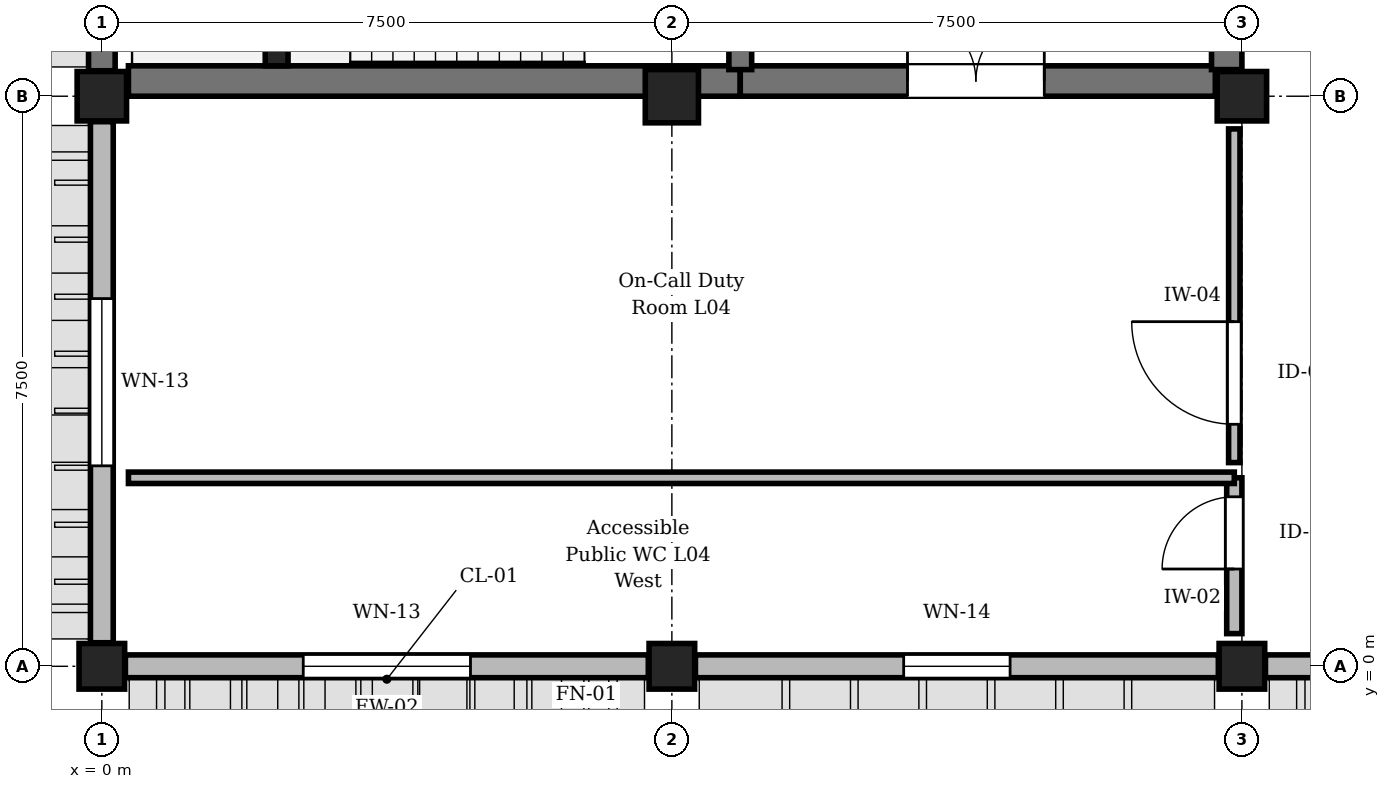
"""IFC4 building model, lengths in metres.
Left out: names, types, materials, properties, quantities, classifications, styles, units other than length and angle.
Written with IfcOpenShell. Run it as: python <this file> out.ifc"""

import sys

from ifc_helpers import new_model, si_unit, direction, frame, frame_2d, origin, origin_with_axes, origin_2d, place, context, subcontext, project, spatial, rectangle, circle, i_section, extrude, element, fill, save


model = new_model("IFC4")
c1 = context("Model", 3, precision=1e-05, world=origin(), true_north=direction((0.0, 1.0)))
c2 = subcontext(c1, "Body", "Model", "MODEL_VIEW")
j1 = project(units=[si_unit("LENGTHUNIT", "METRE"), si_unit("PLANEANGLEUNIT", "RADIAN")], contexts=[c1])
p1 = place(None, origin())
s1 = spatial("IfcSite", under=j1, at=p1, CompositionType="ELEMENT")
p2 = place(p1, origin())
s2 = spatial("IfcBuilding", under=s1, at=p2, CompositionType="ELEMENT")
p3 = place(p2, frame((0.0, 0.0, 17.85)))
s3 = spatial("IfcBuildingStorey", under=s2, at=p3, CompositionType="ELEMENT", Elevation=17.85)
p4 = place(p3, origin_with_axes())
e1 = element("IfcColumn", 1, at=p4, inside=s3, PredefinedType="COLUMN", context=c2, shape_type="SweptSolid", body=[
    extrude(circle(Radius=0.3, at=origin_2d()), origin(), (0.0, 0.0, 1.0), 4.05),
])
p5 = place(p3, frame((0.0, 7.5, 0.0), z_axis=(0.0, 0.0, 1.0), x_axis=(1.0, 0.0, 0.0)))
e2 = element("IfcColumn", 2, at=p5, inside=s3, PredefinedType="COLUMN", context=c2, shape_type="SweptSolid", body=[
    extrude(rectangle(XDim=0.65, YDim=0.65, at=origin_2d()), origin(), (0.0, 0.0, 1.0), 4.05),
])
p6 = place(p3, frame((7.5, 0.0, 0.0), z_axis=(0.0, 0.0, 1.0), x_axis=(1.0, 0.0, 0.0)))
e3 = element("IfcColumn", 3, at=p6, inside=s3, PredefinedType="COLUMN", context=c2, shape_type="SweptSolid", body=[
    extrude(rectangle(XDim=0.6, YDim=0.6, at=origin_2d()), origin(), (0.0, 0.0, 1.0), 4.05),
])
p7 = place(p3, frame((7.5, 7.5, 0.0), z_axis=(0.0, 0.0, 1.0), x_axis=(1.0, 0.0, 0.0)))
e4 = element("IfcColumn", 4, at=p7, inside=s3, PredefinedType="COLUMN", context=c2, shape_type="SweptSolid", body=[
    extrude(rectangle(XDim=0.7, YDim=0.7, at=origin_2d()), origin(), (0.0, 0.0, 1.0), 4.05),
])
p8 = place(p3, frame((15.0, 0.0, 0.0), z_axis=(0.0, 0.0, 1.0), x_axis=(1.0, 0.0, 0.0)))
e5 = element("IfcColumn", 5, at=p8, inside=s3, PredefinedType="COLUMN", context=c2, shape_type="SweptSolid", body=[
    extrude(rectangle(XDim=0.6, YDim=0.6, at=origin_2d()), origin(), (0.0, 0.0, 1.0), 4.05),
])
p9 = place(p3, frame((15.0, 7.5, 0.0), z_axis=(0.0, 0.0, 1.0), x_axis=(1.0, 0.0, 0.0)))
e6 = element("IfcColumn", 6, at=p9, inside=s3, PredefinedType="COLUMN", context=c2, shape_type="SweptSolid", body=[
    extrude(rectangle(XDim=0.65, YDim=0.65, at=origin_2d()), origin(), (0.0, 0.0, 1.0), 4.05),
])
p10 = place(p3, frame((2.3, 8.05, 0.0), z_axis=(0.0, 0.0, 1.0), x_axis=(1.0, 0.0, 0.0)))
e7 = element("IfcColumn", 7, at=p10, inside=s3, PredefinedType="COLUMN", context=c2, shape_type="SweptSolid", body=[
    extrude(i_section(OverallWidth=0.3, OverallDepth=0.3, WebThickness=0.011, FlangeThickness=0.019, FilletRadius=0.027, at=origin_2d()), origin(), (0.0, 0.0, 1.0), 4.05),
])
p11 = place(p3, frame((7.19, 0.0, 0.0), z_axis=(0.0, 0.0, 1.0), x_axis=(-1.0, 0.0, 0.0)))
e8 = element("IfcWall", 8, at=p11, inside=s3, PredefinedType="STANDARD", context=c2, shape_type="SweptSolid", body=[
    extrude(rectangle(XDim=6.88, YDim=0.3, at=frame_2d((3.44, 0.0))), origin(), (0.0, 0.0, 1.0), 3.17),
])
p12 = place(p11, frame((2.34, 0.0, 0.9)))
e9 = element("IfcOpeningElement", 9, at=p12, cuts=e8, PredefinedType="OPENING", context=c2, shape_type="SweptSolid", body=[
    extrude(rectangle(XDim=2.2, YDim=1.95, at=frame_2d((1.1, 0.975))), frame((0.0, 0.16, 0.0), z_axis=(0.0, -1.0, 0.0), x_axis=(1.0, 0.0, 0.0)), (0.0, 0.0, 1.0), 0.32),
])
p13 = place(p3, frame((0.0, 0.31, 0.0), z_axis=(0.0, 0.0, 1.0), x_axis=(0.0, 1.0, 0.0)))
e10 = element("IfcWall", 10, at=p13, inside=s3, PredefinedType="STANDARD", context=c2, shape_type="SweptSolid", body=[
    extrude(rectangle(XDim=6.855, YDim=0.3, at=frame_2d((3.427, 0.0))), origin(), (0.0, 0.0, 1.0), 3.17),
])
p14 = place(p13, frame((2.327, 0.0, 0.9)))
e11 = element("IfcOpeningElement", 11, at=p14, cuts=e10, PredefinedType="OPENING", context=c2, shape_type="SweptSolid", body=[
    extrude(rectangle(XDim=2.2, YDim=1.95, at=frame_2d((1.1, 0.975))), frame((0.0, 0.16, 0.0), z_axis=(0.0, -1.0, 0.0), x_axis=(1.0, 0.0, 0.0)), (0.0, 0.0, 1.0), 0.32),
])
p15 = place(p3, frame((0.0, 7.835, 0.0), z_axis=(0.0, 0.0, 1.0), x_axis=(0.0, 1.0, 0.0)))
e12 = element("IfcWall", 12, at=p15, inside=s3, PredefinedType="SHEAR", context=c2, shape_type="SweptSolid", body=[
    extrude(rectangle(XDim=6.805, YDim=0.35, at=frame_2d((3.402, 0.0))), origin(), (0.0, 0.0, 1.0), 3.77),
])
p16 = place(p3, frame((14.69, 0.0, 0.0), z_axis=(0.0, 0.0, 1.0), x_axis=(-1.0, 0.0, 0.0)))
e13 = element("IfcWall", 13, at=p16, inside=s3, PredefinedType="STANDARD", context=c2, shape_type="SweptSolid", body=[
    extrude(rectangle(XDim=6.88, YDim=0.3, at=frame_2d((3.44, 0.0))), origin(), (0.0, 0.0, 1.0), 3.17),
])
p17 = place(p16, frame((2.74, 0.0, 0.9)))
e14 = element("IfcOpeningElement", 14, at=p17, cuts=e13, PredefinedType="OPENING", context=c2, shape_type="SweptSolid", body=[
    extrude(rectangle(XDim=1.4, YDim=1.8, at=frame_2d((0.7, 0.9))), frame((0.0, 0.16, 0.0), z_axis=(0.0, -1.0, 0.0), x_axis=(1.0, 0.0, 0.0)), (0.0, 0.0, 1.0), 0.32),
])
p18 = place(p3, frame((22.19, 0.0, 0.0), z_axis=(0.0, 0.0, 1.0), x_axis=(-1.0, 0.0, 0.0)))
e15 = element("IfcWall", 15, at=p18, inside=s3, PredefinedType="STANDARD", context=c2, shape_type="SweptSolid", body=[
    extrude(rectangle(XDim=6.88, YDim=0.3, at=frame_2d((3.44, 0.0))), origin(), (0.0, 0.0, 1.0), 3.17),
])
p19 = place(p18, frame((2.64, 0.0, 0.9)))
e16 = element("IfcOpeningElement", 16, at=p19, cuts=e15, PredefinedType="OPENING", context=c2, shape_type="SweptSolid", body=[
    extrude(rectangle(XDim=1.6, YDim=1.8, at=frame_2d((0.8, 0.9))), frame((0.0, 0.16, 0.0), z_axis=(0.0, -1.0, 0.0), x_axis=(1.0, 0.0, 0.0)), (0.0, 0.0, 1.0), 0.32),
])
p20 = place(p3, frame((0.35, 7.7, 0.0), z_axis=(0.0, 0.0, 1.0), x_axis=(1.0, 0.0, 0.0)))
e17 = element("IfcWall", 17, at=p20, inside=s3, PredefinedType="SHEAR", context=c2, shape_type="SweptSolid", body=[
    extrude(rectangle(XDim=8.05, YDim=0.4, at=frame_2d((4.025, 0.0))), origin(), (0.0, 0.0, 1.0), 3.77),
])
p21 = place(p3, frame((8.4, 7.7, 0.0), z_axis=(0.0, 0.0, 1.0), x_axis=(1.0, 0.0, 0.0)))
e18 = element("IfcWall", 18, at=p21, inside=s3, PredefinedType="SHEAR", context=c2, shape_type="SweptSolid", body=[
    extrude(rectangle(XDim=6.25, YDim=0.4, at=frame_2d((3.125, 0.0))), origin(), (0.0, 0.0, 1.0), 3.77),
])
p22 = place(p21, frame((2.2, 0.0, 0.0)))
e19 = element("IfcOpeningElement", 19, at=p22, cuts=e18, PredefinedType="OPENING", context=c2, shape_type="SweptSolid", body=[
    extrude(rectangle(XDim=1.8, YDim=2.25, at=frame_2d((0.9, 1.125))), frame((0.0, 0.21, 0.0), z_axis=(0.0, -1.0, 0.0), x_axis=(1.0, 0.0, 0.0)), (0.0, 0.0, 1.0), 0.42),
])
p23 = place(p3, frame((14.8, 7.85, 0.0), z_axis=(0.0, 0.0, 1.0), x_axis=(0.0, 1.0, 0.0)))
e20 = element("IfcWall", 20, at=p23, inside=s3, PredefinedType="SHEAR", context=c2, shape_type="SweptSolid", body=[
    extrude(rectangle(XDim=3.75, YDim=0.4, at=frame_2d((1.875, 0.0))), origin(), (0.0, 0.0, 1.0), 3.77),
])
p24 = place(p3, frame((8.4, 11.5, 0.0), z_axis=(0.0, 0.0, 1.0), x_axis=(0.0, -1.0, 0.0)))
e21 = element("IfcWall", 21, at=p24, inside=s3, PredefinedType="SHEAR", context=c2, shape_type="SweptSolid", body=[
    extrude(rectangle(XDim=3.65, YDim=0.3, at=frame_2d((1.825, 0.0))), origin(), (0.0, 0.0, 1.0), 3.77),
])
p25 = place(p24, frame((1.22, 0.0, 0.0)))
e22 = element("IfcOpeningElement", 22, at=p25, cuts=e21, PredefinedType="OPENING", context=c2, shape_type="SweptSolid", body=[
    extrude(rectangle(XDim=1.2, YDim=2.25, at=frame_2d((0.6, 1.125))), frame((0.0, 0.16, 0.0), z_axis=(0.0, -1.0, 0.0), x_axis=(1.0, 0.0, 0.0)), (0.0, 0.0, 1.0), 0.32),
])
p26 = place(p3, frame((14.9, 0.43, 0.0), z_axis=(0.0, 0.0, 1.0), x_axis=(0.0, 1.0, 0.0)))
e23 = element("IfcWall", 23, at=p26, inside=s3, PredefinedType="STANDARD", context=c2, shape_type="SweptSolid", body=[
    extrude(rectangle(XDim=2.05, YDim=0.2, at=frame_2d((1.025, 0.0))), origin(), (0.0, 0.0, 1.0), 3.205),
])
p27 = place(p26, frame((0.85, 0.0, 0.0)))
e24 = element("IfcOpeningElement", 24, at=p27, cuts=e23, PredefinedType="OPENING", context=c2, shape_type="SweptSolid", body=[
    extrude(rectangle(XDim=0.95, YDim=2.15, at=frame_2d((0.475, 1.075))), frame((0.0, 0.11, 0.0), z_axis=(0.0, -1.0, 0.0), x_axis=(1.0, 0.0, 0.0)), (0.0, 0.0, 1.0), 0.22),
])
p28 = place(p3, frame((14.9, 2.68, 0.0), z_axis=(0.0, 0.0, 1.0), x_axis=(0.0, 1.0, 0.0)))
e25 = element("IfcWall", 25, at=p28, inside=s3, PredefinedType="PARTITIONING", context=c2, shape_type="SweptSolid", body=[
    extrude(rectangle(XDim=4.39, YDim=0.15, at=frame_2d((2.195, 0.0))), origin(), (0.0, 0.0, 1.0), 3.205),
])
p29 = place(p28, frame((0.504, 0.0, 0.0)))
e26 = element("IfcOpeningElement", 26, at=p29, cuts=e25, PredefinedType="OPENING", context=c2, shape_type="SweptSolid", body=[
    extrude(rectangle(XDim=1.35, YDim=2.25, at=frame_2d((0.675, 1.125))), frame((0.0, 0.085, 0.0), z_axis=(0.0, -1.0, 0.0), x_axis=(1.0, 0.0, 0.0)), (0.0, 0.0, 1.0), 0.17),
])
p30 = place(p3, frame((0.35, 2.48, 0.0), z_axis=(0.0, 0.0, 1.0), x_axis=(1.0, 0.0, 0.0)))
e27 = element("IfcWall", 27, at=p30, inside=s3, PredefinedType="PARTITIONING", context=c2, shape_type="SweptSolid", body=[
    extrude(rectangle(XDim=14.55, YDim=0.15, at=frame_2d((7.275, 0.0))), origin(), (0.0, 0.0, 1.0), 3.755),
])
p31 = place(p12, origin())
e28 = element("IfcWindow", 28, at=p31, inside=s3, PartitioningType="SINGLE_PANEL", PredefinedType="WINDOW", context=c2, shape_type="SweptSolid", body=[
    extrude(rectangle(XDim=2.2, YDim=1.95, at=frame_2d((1.1, 0.975))), frame((0.0, 0.03, 0.0), z_axis=(0.0, -1.0, 0.0), x_axis=(1.0, 0.0, 0.0)), (0.0, 0.0, 1.0), 0.06),
])
fill(e9, e28)
p32 = place(p14, origin())
e29 = element("IfcWindow", 29, at=p32, inside=s3, PartitioningType="SINGLE_PANEL", PredefinedType="WINDOW", context=c2, shape_type="SweptSolid", body=[
    extrude(rectangle(XDim=2.2, YDim=1.95, at=frame_2d((1.1, 0.975))), frame((0.0, 0.03, 0.0), z_axis=(0.0, -1.0, 0.0), x_axis=(1.0, 0.0, 0.0)), (0.0, 0.0, 1.0), 0.06),
])
fill(e11, e29)
p33 = place(p17, origin())
e30 = element("IfcWindow", 30, at=p33, inside=s3, PartitioningType="SINGLE_PANEL", PredefinedType="WINDOW", context=c2, shape_type="SweptSolid", body=[
    extrude(rectangle(XDim=1.4, YDim=1.8, at=frame_2d((0.7, 0.9))), frame((0.0, 0.03, 0.0), z_axis=(0.0, -1.0, 0.0), x_axis=(1.0, 0.0, 0.0)), (0.0, 0.0, 1.0), 0.06),
])
fill(e14, e30)
p34 = place(p22, origin())
e31 = element("IfcDoor", 31, at=p34, inside=s3, OperationType="DOUBLE_DOOR_SINGLE_SWING", PredefinedType="DOOR", context=c2, shape_type="SweptSolid", body=[
    extrude(rectangle(XDim=1.8, YDim=2.25, at=frame_2d((0.9, 1.125))), frame((0.0, 0.025, 0.0), z_axis=(0.0, -1.0, 0.0), x_axis=(1.0, 0.0, 0.0)), (0.0, 0.0, 1.0), 0.05),
])
fill(e19, e31)
p35 = place(p27, origin())
e32 = element("IfcDoor", 32, at=p35, inside=s3, OperationType="SINGLE_SWING_LEFT", PredefinedType="DOOR", context=c2, shape_type="SweptSolid", body=[
    extrude(rectangle(XDim=0.95, YDim=2.15, at=frame_2d((0.475, 1.075))), frame((0.0, 0.025, 0.0), z_axis=(0.0, -1.0, 0.0), x_axis=(1.0, 0.0, 0.0)), (0.0, 0.0, 1.0), 0.05),
])
fill(e24, e32)
p36 = place(p29, origin())
e33 = element("IfcDoor", 33, at=p36, inside=s3, OperationType="SINGLE_SWING_RIGHT", PredefinedType="DOOR", context=c2, shape_type="SweptSolid", body=[
    extrude(rectangle(XDim=1.35, YDim=2.25, at=frame_2d((0.675, 1.125))), frame((0.0, 0.025, 0.0), z_axis=(0.0, -1.0, 0.0), x_axis=(1.0, 0.0, 0.0)), (0.0, 0.0, 1.0), 0.05),
])
fill(e26, e33)
save(model, sys.argv[1])
